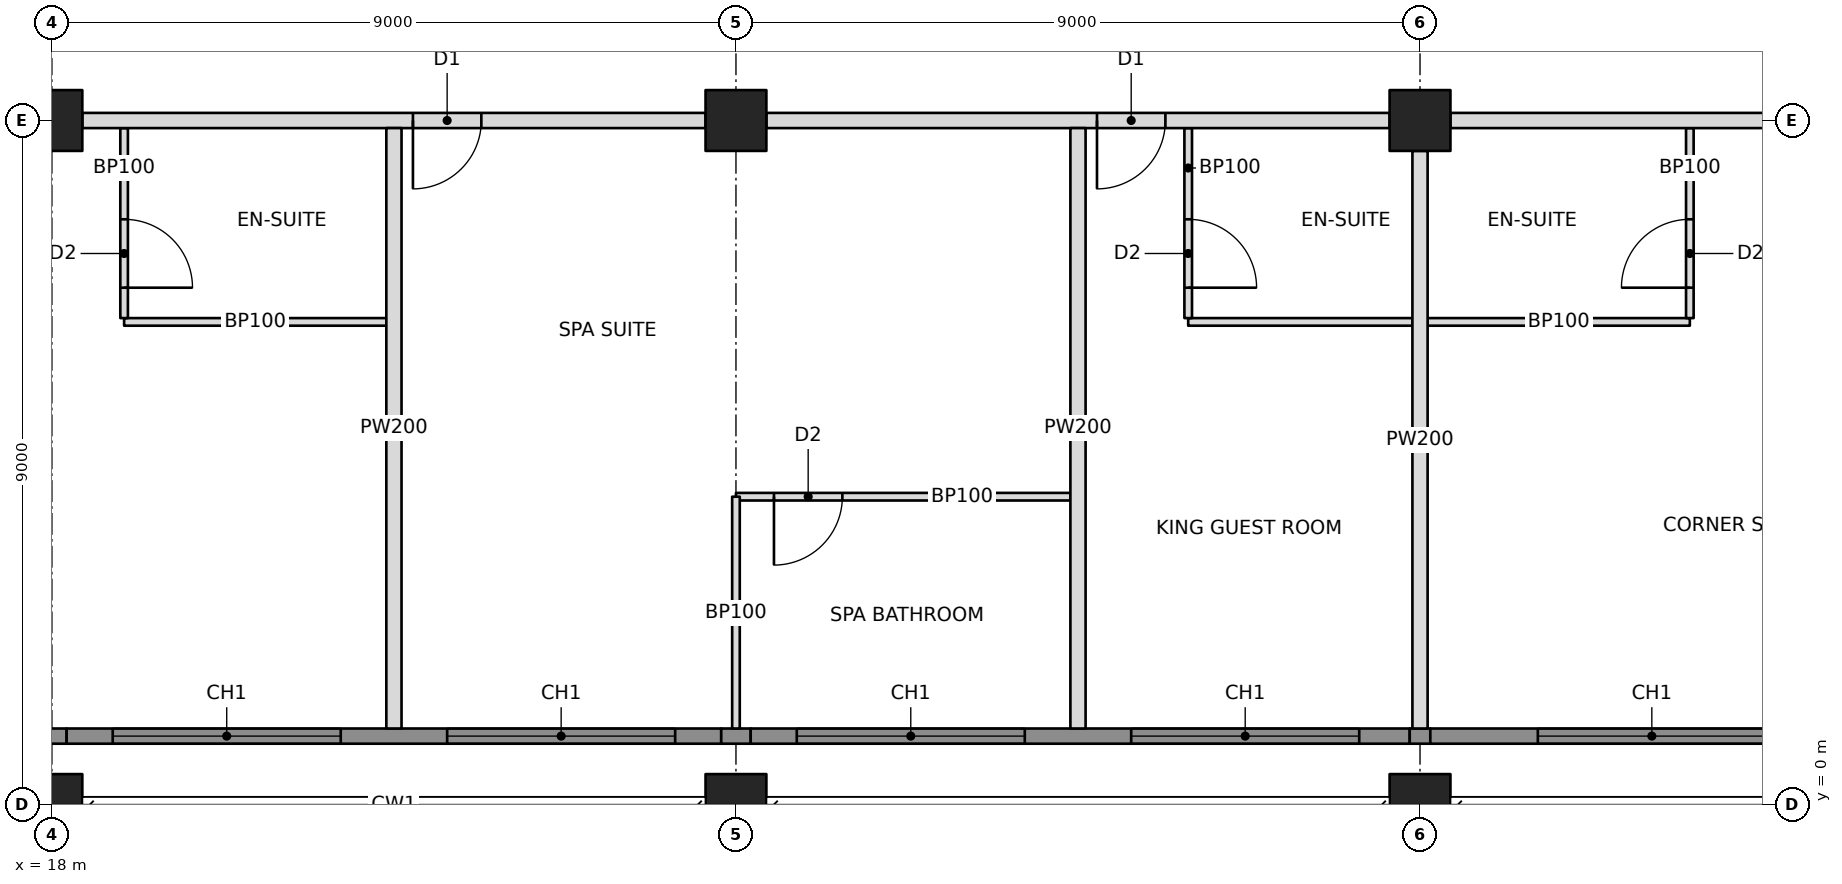
"""IFC4 building model, lengths in metres.
Left out: names, types, materials, properties, quantities, classifications, styles, units other than length and angle.
Written with IfcOpenShell. Run it as: python <this file> out.ifc"""

import sys

from ifc_helpers import new_model, si_unit, direction, frame, frame_2d, origin, origin_2d, place, context, subcontext, project, spatial, rectangle, hollow_rectangle, extrude, element, fill, save


model = new_model("IFC4")
c1 = context("Model", 3, precision=1e-05, world=origin(), true_north=direction((0.0, 1.0)))
c2 = subcontext(c1, "Body", "Model", "MODEL_VIEW")
j1 = project(units=[si_unit("LENGTHUNIT", "METRE"), si_unit("PLANEANGLEUNIT", "RADIAN")], contexts=[c1])
p1 = place(None, origin())
s1 = spatial("IfcSite", under=j1, at=p1, CompositionType="ELEMENT")
p2 = place(p1, origin())
s2 = spatial("IfcBuilding", under=s1, at=p2, CompositionType="ELEMENT")
p3 = place(p2, frame((0.0, 0.0, 211.4)))
s3 = spatial("IfcBuildingStorey", under=s2, at=p3, CompositionType="ELEMENT", Elevation=211.4)
p4 = place(p3, frame((18.0, 0.0, 0.0), z_axis=(0.0, 0.0, 1.0), x_axis=(1.0, 0.0, 0.0)))
e1 = element("IfcColumn", 1, at=p4, inside=s3, PredefinedType="COLUMN", context=c2, shape_type="SweptSolid", body=[
    extrude(hollow_rectangle(XDim=0.8, YDim=0.8, WallThickness=0.06, at=origin_2d()), origin(), (0.0, 0.0, 1.0), 3.4),
])
p5 = place(p3, frame((18.0, 9.0, 0.0), z_axis=(0.0, 0.0, 1.0), x_axis=(1.0, 0.0, 0.0)))
e2 = element("IfcColumn", 2, at=p5, inside=s3, PredefinedType="COLUMN", context=c2, shape_type="SweptSolid", body=[
    extrude(hollow_rectangle(XDim=0.8, YDim=0.8, WallThickness=0.05, at=origin_2d()), origin(), (0.0, 0.0, 1.0), 3.4),
])
p6 = place(p3, frame((27.0, 0.0, 0.0), z_axis=(0.0, 0.0, 1.0), x_axis=(1.0, 0.0, 0.0)))
e3 = element("IfcColumn", 3, at=p6, inside=s3, PredefinedType="COLUMN", context=c2, shape_type="SweptSolid", body=[
    extrude(hollow_rectangle(XDim=0.8, YDim=0.8, WallThickness=0.06, at=origin_2d()), origin(), (0.0, 0.0, 1.0), 3.4),
])
p7 = place(p3, frame((27.0, 9.0, 0.0), z_axis=(0.0, 0.0, 1.0), x_axis=(1.0, 0.0, 0.0)))
e4 = element("IfcColumn", 4, at=p7, inside=s3, PredefinedType="COLUMN", context=c2, shape_type="SweptSolid", body=[
    extrude(hollow_rectangle(XDim=0.8, YDim=0.8, WallThickness=0.05, at=origin_2d()), origin(), (0.0, 0.0, 1.0), 3.4),
])
p8 = place(p3, frame((36.0, 0.0, 0.0), z_axis=(0.0, 0.0, 1.0), x_axis=(1.0, 0.0, 0.0)))
e5 = element("IfcColumn", 5, at=p8, inside=s3, PredefinedType="COLUMN", context=c2, shape_type="SweptSolid", body=[
    extrude(hollow_rectangle(XDim=0.8, YDim=0.8, WallThickness=0.06, at=origin_2d()), origin(), (0.0, 0.0, 1.0), 3.4),
])
p9 = place(p3, frame((36.0, 9.0, 0.0), z_axis=(0.0, 0.0, 1.0), x_axis=(0.0, 1.0, 0.0)))
e6 = element("IfcColumn", 6, at=p9, inside=s3, PredefinedType="COLUMN", context=c2, shape_type="SweptSolid", body=[
    extrude(hollow_rectangle(XDim=0.8, YDim=0.8, WallThickness=0.05, at=origin_2d()), origin(), (0.0, 0.0, 1.0), 3.4),
])
p10 = place(p3, frame((18.4, 9.0, 0.0), z_axis=(0.0, 0.0, 1.0), x_axis=(1.0, 0.0, 0.0)))
e7 = element("IfcWall", 7, at=p10, inside=s3, PredefinedType="PARTITIONING", context=c2, shape_type="SweptSolid", body=[
    extrude(rectangle(XDim=8.2, YDim=0.2, at=frame_2d((4.1, 0.0))), origin(), (0.0, 0.0, 1.0), 2.405),
])
p11 = place(p10, frame((4.35, 0.0, 0.0)))
e8 = element("IfcOpeningElement", 8, at=p11, cuts=e7, PredefinedType="OPENING", context=c2, shape_type="SweptSolid", body=[
    extrude(rectangle(XDim=0.9, YDim=2.1, at=frame_2d((0.45, 1.05))), frame((0.0, 0.11, 0.0), z_axis=(0.0, -1.0, 0.0), x_axis=(1.0, 0.0, 0.0)), (0.0, 0.0, 1.0), 0.22),
])
p12 = place(p3, frame((27.4, 9.0, 0.0), z_axis=(0.0, 0.0, 1.0), x_axis=(1.0, 0.0, 0.0)))
e9 = element("IfcWall", 9, at=p12, inside=s3, PredefinedType="PARTITIONING", context=c2, shape_type="SweptSolid", body=[
    extrude(rectangle(XDim=8.2, YDim=0.2, at=frame_2d((4.1, 0.0))), origin(), (0.0, 0.0, 1.0), 2.405),
])
p13 = place(p12, frame((4.35, 0.0, 0.0)))
e10 = element("IfcOpeningElement", 10, at=p13, cuts=e9, PredefinedType="OPENING", context=c2, shape_type="SweptSolid", body=[
    extrude(rectangle(XDim=0.9, YDim=2.1, at=frame_2d((0.45, 1.05))), frame((0.0, 0.11, 0.0), z_axis=(0.0, -1.0, 0.0), x_axis=(1.0, 0.0, 0.0)), (0.0, 0.0, 1.0), 0.22),
])
p14 = place(p3, frame((36.4, 9.0, 0.0), z_axis=(0.0, 0.0, 1.0), x_axis=(1.0, 0.0, 0.0)))
e11 = element("IfcWall", 11, at=p14, inside=s3, PredefinedType="PARTITIONING", context=c2, shape_type="SweptSolid", body=[
    extrude(rectangle(XDim=7.6, YDim=0.2, at=frame_2d((3.8, 0.0))), origin(), (0.0, 0.0, 1.0), 2.438),
])
p15 = place(p14, frame((6.45, 0.0, 0.0)))
e12 = element("IfcOpeningElement", 12, at=p15, cuts=e11, PredefinedType="OPENING", context=c2, shape_type="SweptSolid", body=[
    extrude(rectangle(XDim=0.9, YDim=2.1, at=frame_2d((0.45, 1.05))), frame((0.0, 0.11, 0.0), z_axis=(0.0, -1.0, 0.0), x_axis=(1.0, 0.0, 0.0)), (0.0, 0.0, 1.0), 0.22),
])
for number, where, z_axis, x_axis in (
    (13, (22.5, 8.9, 0.0), (0.0, 0.0, 1.0), (0.0, -1.0, 0.0)),
    (14, (31.5, 8.9, 0.0), (0.0, 0.0, 1.0), (0.0, -1.0, 0.0)),
):
    element("IfcWall", number, at=place(p3, frame(where, z_axis=z_axis, x_axis=x_axis)), inside=s3, PredefinedType="PARTITIONING", context=c2, shape_type="SweptSolid", body=[
        extrude(rectangle(XDim=7.9, YDim=0.2, at=frame_2d((3.95, 0.0))), origin(), (0.0, 0.0, 1.0), 2.404),
    ])
p16 = place(p3, frame((36.0, 8.6, 0.0), z_axis=(0.0, 0.0, 1.0), x_axis=(0.0, -1.0, 0.0)))
e15 = element("IfcWall", 15, at=p16, inside=s3, PredefinedType="PARTITIONING", context=c2, shape_type="SweptSolid", body=[
    extrude(rectangle(XDim=7.6, YDim=0.2, at=frame_2d((3.8, 0.0))), origin(), (0.0, 0.0, 1.0), 2.438),
])
p17 = place(p3, frame((18.95, 6.35, 0.0), z_axis=(0.0, 0.0, 1.0), x_axis=(1.0, 0.0, 0.0)))
e16 = element("IfcWall", 16, at=p17, inside=s3, PredefinedType="PARTITIONING", context=c2, shape_type="SweptSolid", body=[
    extrude(rectangle(XDim=3.45, YDim=0.1, at=frame_2d((1.725, 0.0))), origin(), (0.0, 0.0, 1.0), 3.2),
])
p18 = place(p3, frame((18.95, 8.9, 0.0), z_axis=(0.0, 0.0, 1.0), x_axis=(0.0, -1.0, 0.0)))
e17 = element("IfcWall", 17, at=p18, inside=s3, PredefinedType="PARTITIONING", context=c2, shape_type="SweptSolid", body=[
    extrude(rectangle(XDim=2.5, YDim=0.1, at=frame_2d((1.25, 0.0))), origin(), (0.0, 0.0, 1.0), 2.404),
])
p19 = place(p18, frame((1.2, 0.0, 0.0)))
e18 = element("IfcOpeningElement", 18, at=p19, cuts=e17, PredefinedType="OPENING", context=c2, shape_type="SweptSolid", body=[
    extrude(rectangle(XDim=0.9, YDim=2.1, at=frame_2d((0.45, 1.05))), frame((0.0, 0.06, 0.0), z_axis=(0.0, -1.0, 0.0), x_axis=(1.0, 0.0, 0.0)), (0.0, 0.0, 1.0), 0.12),
])
p20 = place(p3, frame((27.0, 4.05, 0.0), z_axis=(0.0, 0.0, 1.0), x_axis=(1.0, 0.0, 0.0)))
e19 = element("IfcWall", 19, at=p20, inside=s3, PredefinedType="PARTITIONING", context=c2, shape_type="SweptSolid", body=[
    extrude(rectangle(XDim=4.4, YDim=0.1, at=frame_2d((2.2, 0.0))), origin(), (0.0, 0.0, 1.0), 2.404),
])
p21 = place(p20, frame((0.5, 0.0, 0.0)))
e20 = element("IfcOpeningElement", 20, at=p21, cuts=e19, PredefinedType="OPENING", context=c2, shape_type="SweptSolid", body=[
    extrude(rectangle(XDim=0.9, YDim=2.1, at=frame_2d((0.45, 1.05))), frame((0.0, 0.06, 0.0), z_axis=(0.0, -1.0, 0.0), x_axis=(1.0, 0.0, 0.0)), (0.0, 0.0, 1.0), 0.12),
])
p22 = place(p3, frame((27.0, 4.05, 0.0), z_axis=(0.0, 0.0, 1.0), x_axis=(0.0, -1.0, 0.0)))
e21 = element("IfcWall", 21, at=p22, inside=s3, PredefinedType="PARTITIONING", context=c2, shape_type="SweptSolid", body=[
    extrude(rectangle(XDim=3.05, YDim=0.1, at=frame_2d((1.525, 0.0))), origin(), (0.0, 0.0, 1.0), 2.405),
])
p23 = place(p3, frame((32.95, 6.35, 0.0), z_axis=(0.0, 0.0, 1.0), x_axis=(1.0, 0.0, 0.0)))
e22 = element("IfcWall", 22, at=p23, inside=s3, PredefinedType="PARTITIONING", context=c2, shape_type="SweptSolid", body=[
    extrude(rectangle(XDim=2.95, YDim=0.1, at=frame_2d((1.475, 0.0))), origin(), (0.0, 0.0, 1.0), 2.438),
])
p24 = place(p3, frame((32.95, 8.9, 0.0), z_axis=(0.0, 0.0, 1.0), x_axis=(0.0, -1.0, 0.0)))
e23 = element("IfcWall", 23, at=p24, inside=s3, PredefinedType="PARTITIONING", context=c2, shape_type="SweptSolid", body=[
    extrude(rectangle(XDim=2.5, YDim=0.1, at=frame_2d((1.25, 0.0))), origin(), (0.0, 0.0, 1.0), 2.404),
])
p25 = place(p24, frame((1.2, 0.0, 0.0)))
e24 = element("IfcOpeningElement", 24, at=p25, cuts=e23, PredefinedType="OPENING", context=c2, shape_type="SweptSolid", body=[
    extrude(rectangle(XDim=0.9, YDim=2.1, at=frame_2d((0.45, 1.05))), frame((0.0, 0.06, 0.0), z_axis=(0.0, -1.0, 0.0), x_axis=(1.0, 0.0, 0.0)), (0.0, 0.0, 1.0), 0.12),
])
p26 = place(p3, frame((36.1, 6.35, 0.0), z_axis=(0.0, 0.0, 1.0), x_axis=(1.0, 0.0, 0.0)))
e25 = element("IfcWall", 25, at=p26, inside=s3, PredefinedType="PARTITIONING", context=c2, shape_type="SweptSolid", body=[
    extrude(rectangle(XDim=3.45, YDim=0.1, at=frame_2d((1.725, 0.0))), origin(), (0.0, 0.0, 1.0), 2.438),
])
p27 = place(p3, frame((39.55, 8.9, 0.0), z_axis=(0.0, 0.0, 1.0), x_axis=(0.0, -1.0, 0.0)))
e26 = element("IfcWall", 26, at=p27, inside=s3, PredefinedType="PARTITIONING", context=c2, shape_type="SweptSolid", body=[
    extrude(rectangle(XDim=2.5, YDim=0.1, at=frame_2d((1.25, 0.0))), origin(), (0.0, 0.0, 1.0), 2.438),
])
p28 = place(p27, frame((1.2, 0.0, 0.0)))
e27 = element("IfcOpeningElement", 27, at=p28, cuts=e26, PredefinedType="OPENING", context=c2, shape_type="SweptSolid", body=[
    extrude(rectangle(XDim=0.9, YDim=2.1, at=frame_2d((0.45, 1.05))), frame((0.0, 0.06, 0.0), z_axis=(0.0, -1.0, 0.0), x_axis=(1.0, 0.0, 0.0)), (0.0, 0.0, 1.0), 0.12),
])
p29 = place(p3, frame((17.806, 0.9, 0.0), z_axis=(0.0, 0.0, 1.0), x_axis=(1.0, 0.0, 0.0)))
e28 = element("IfcWall", 28, at=p29, inside=s3, PredefinedType="SOLIDWALL", context=c2, shape_type="SweptSolid", body=[
    extrude(rectangle(XDim=0.388, YDim=0.2, at=frame_2d((0.194, 0.0))), origin(), (0.0, 0.0, 1.0), 2.404),
])
p30 = place(p3, frame((18.194, 0.9, 0.0), z_axis=(0.0, 0.0, 1.0), x_axis=(1.0, 0.0, 0.0)))
e29 = element("IfcWall", 29, at=p30, inside=s3, PredefinedType="SOLIDWALL", context=c2, shape_type="SweptSolid", body=[
    extrude(rectangle(XDim=8.612, YDim=0.2, at=frame_2d((4.306, 0.0))), origin(), (0.0, 0.0, 1.0), 3.2),
])
p31 = place(p30, frame((0.606, 0.0, 0.6)))
e30 = element("IfcOpeningElement", 30, at=p31, cuts=e29, PredefinedType="OPENING", context=c2, shape_type="SweptSolid", body=[
    extrude(rectangle(XDim=3.0, YDim=2.2, at=frame_2d((1.5, 1.1))), frame((0.0, 0.11, 0.0), z_axis=(0.0, -1.0, 0.0), x_axis=(1.0, 0.0, 0.0)), (0.0, 0.0, 1.0), 0.22),
])
p32 = place(p30, frame((5.006, 0.0, 0.6)))
e31 = element("IfcOpeningElement", 31, at=p32, cuts=e29, PredefinedType="OPENING", context=c2, shape_type="SweptSolid", body=[
    extrude(rectangle(XDim=3.0, YDim=2.2, at=frame_2d((1.5, 1.1))), frame((0.0, 0.11, 0.0), z_axis=(0.0, -1.0, 0.0), x_axis=(1.0, 0.0, 0.0)), (0.0, 0.0, 1.0), 0.22),
])
p33 = place(p3, frame((26.806, 0.9, 0.0), z_axis=(0.0, 0.0, 1.0), x_axis=(1.0, 0.0, 0.0)))
e32 = element("IfcWall", 32, at=p33, inside=s3, PredefinedType="SOLIDWALL", context=c2, shape_type="SweptSolid", body=[
    extrude(rectangle(XDim=0.388, YDim=0.2, at=frame_2d((0.194, 0.0))), origin(), (0.0, 0.0, 1.0), 2.404),
])
p34 = place(p3, frame((27.194, 0.9, 0.0), z_axis=(0.0, 0.0, 1.0), x_axis=(1.0, 0.0, 0.0)))
e33 = element("IfcWall", 33, at=p34, inside=s3, PredefinedType="SOLIDWALL", context=c2, shape_type="SweptSolid", body=[
    extrude(rectangle(XDim=8.671, YDim=0.2, at=frame_2d((4.335, 0.0))), origin(), (0.0, 0.0, 1.0), 3.2),
])
p35 = place(p34, frame((0.606, 0.0, 0.6)))
e34 = element("IfcOpeningElement", 34, at=p35, cuts=e33, PredefinedType="OPENING", context=c2, shape_type="SweptSolid", body=[
    extrude(rectangle(XDim=3.0, YDim=2.2, at=frame_2d((1.5, 1.1))), frame((0.0, 0.11, 0.0), z_axis=(0.0, -1.0, 0.0), x_axis=(1.0, 0.0, 0.0)), (0.0, 0.0, 1.0), 0.22),
])
p36 = place(p34, frame((5.006, 0.0, 0.6)))
e35 = element("IfcOpeningElement", 35, at=p36, cuts=e33, PredefinedType="OPENING", context=c2, shape_type="SweptSolid", body=[
    extrude(rectangle(XDim=3.0, YDim=2.2, at=frame_2d((1.5, 1.1))), frame((0.0, 0.11, 0.0), z_axis=(0.0, -1.0, 0.0), x_axis=(1.0, 0.0, 0.0)), (0.0, 0.0, 1.0), 0.22),
])
p37 = place(p3, frame((35.865, 0.9, 0.0), z_axis=(0.0, 0.0, 1.0), x_axis=(1.0, 0.0, 0.0)))
e36 = element("IfcWall", 36, at=p37, inside=s3, PredefinedType="SOLIDWALL", context=c2, shape_type="SweptSolid", body=[
    extrude(rectangle(XDim=0.271, YDim=0.2, at=frame_2d((0.135, 0.0))), origin(), (0.0, 0.0, 1.0), 2.438),
])
p38 = place(p3, frame((36.135, 0.9, 0.0), z_axis=(0.0, 0.0, 1.0), x_axis=(1.0, 0.0, 0.0)))
e37 = element("IfcWall", 37, at=p38, inside=s3, PredefinedType="SOLIDWALL", context=c2, shape_type="SweptSolid", body=[
    extrude(rectangle(XDim=5.865, YDim=0.2, at=frame_2d((2.932, 0.0))), origin(), (0.0, 0.0, 1.0), 3.2),
])
p39 = place(p38, frame((1.415, 0.0, 0.6)))
e38 = element("IfcOpeningElement", 38, at=p39, cuts=e37, PredefinedType="OPENING", context=c2, shape_type="SweptSolid", body=[
    extrude(rectangle(XDim=3.0, YDim=2.2, at=frame_2d((1.5, 1.1))), frame((0.0, 0.11, 0.0), z_axis=(0.0, -1.0, 0.0), x_axis=(1.0, 0.0, 0.0)), (0.0, 0.0, 1.0), 0.22),
])
p40 = place(p31, origin())
e39 = element("IfcWindow", 39, at=p40, inside=s3, PartitioningType="TRIPLE_PANEL_VERTICAL", PredefinedType="WINDOW", context=c2, shape_type="SweptSolid", body=[
    extrude(rectangle(XDim=3.0, YDim=2.2, at=frame_2d((1.5, 1.1))), frame((0.0, 0.03, 0.0), z_axis=(0.0, -1.0, 0.0), x_axis=(1.0, 0.0, 0.0)), (0.0, 0.0, 1.0), 0.06),
])
fill(e30, e39)
p41 = place(p32, origin())
e40 = element("IfcWindow", 40, at=p41, inside=s3, PartitioningType="TRIPLE_PANEL_VERTICAL", PredefinedType="WINDOW", context=c2, shape_type="SweptSolid", body=[
    extrude(rectangle(XDim=3.0, YDim=2.2, at=frame_2d((1.5, 1.1))), frame((0.0, 0.03, 0.0), z_axis=(0.0, -1.0, 0.0), x_axis=(1.0, 0.0, 0.0)), (0.0, 0.0, 1.0), 0.06),
])
fill(e31, e40)
p42 = place(p35, origin())
e41 = element("IfcWindow", 41, at=p42, inside=s3, PartitioningType="TRIPLE_PANEL_VERTICAL", PredefinedType="WINDOW", context=c2, shape_type="SweptSolid", body=[
    extrude(rectangle(XDim=3.0, YDim=2.2, at=frame_2d((1.5, 1.1))), frame((0.0, 0.03, 0.0), z_axis=(0.0, -1.0, 0.0), x_axis=(1.0, 0.0, 0.0)), (0.0, 0.0, 1.0), 0.06),
])
fill(e34, e41)
p43 = place(p36, origin())
e42 = element("IfcWindow", 42, at=p43, inside=s3, PartitioningType="TRIPLE_PANEL_VERTICAL", PredefinedType="WINDOW", context=c2, shape_type="SweptSolid", body=[
    extrude(rectangle(XDim=3.0, YDim=2.2, at=frame_2d((1.5, 1.1))), frame((0.0, 0.03, 0.0), z_axis=(0.0, -1.0, 0.0), x_axis=(1.0, 0.0, 0.0)), (0.0, 0.0, 1.0), 0.06),
])
fill(e35, e42)
p44 = place(p39, origin())
e43 = element("IfcWindow", 43, at=p44, inside=s3, PartitioningType="TRIPLE_PANEL_VERTICAL", PredefinedType="WINDOW", context=c2, shape_type="SweptSolid", body=[
    extrude(rectangle(XDim=3.0, YDim=2.2, at=frame_2d((1.5, 1.1))), frame((0.0, 0.03, 0.0), z_axis=(0.0, -1.0, 0.0), x_axis=(1.0, 0.0, 0.0)), (0.0, 0.0, 1.0), 0.06),
])
fill(e38, e43)
p45 = place(p19, origin())
e44 = element("IfcDoor", 44, at=p45, inside=s3, OperationType="SINGLE_SWING_RIGHT", PredefinedType="DOOR", context=c2, shape_type="SweptSolid", body=[
    extrude(rectangle(XDim=0.9, YDim=2.1, at=frame_2d((0.45, 1.05))), frame((0.0, 0.025, 0.0), z_axis=(0.0, -1.0, 0.0), x_axis=(1.0, 0.0, 0.0)), (0.0, 0.0, 1.0), 0.05),
])
fill(e18, e44)
p46 = place(p21, frame((0.9, 0.0, 0.0), z_axis=(0.0, 0.0, 1.0), x_axis=(-1.0, 0.0, 0.0)))
e45 = element("IfcDoor", 45, at=p46, inside=s3, OperationType="SINGLE_SWING_RIGHT", PredefinedType="DOOR", context=c2, shape_type="SweptSolid", body=[
    extrude(rectangle(XDim=0.9, YDim=2.1, at=frame_2d((0.45, 1.05))), frame((0.0, 0.025, 0.0), z_axis=(0.0, -1.0, 0.0), x_axis=(1.0, 0.0, 0.0)), (0.0, 0.0, 1.0), 0.05),
])
fill(e20, e45)
p47 = place(p11, frame((0.9, 0.0, 0.0), z_axis=(0.0, 0.0, 1.0), x_axis=(-1.0, 0.0, 0.0)))
e46 = element("IfcDoor", 46, at=p47, inside=s3, OperationType="SINGLE_SWING_RIGHT", PredefinedType="DOOR", context=c2, shape_type="SweptSolid", body=[
    extrude(rectangle(XDim=0.9, YDim=2.1, at=frame_2d((0.45, 1.05))), frame((0.0, 0.025, 0.0), z_axis=(0.0, -1.0, 0.0), x_axis=(1.0, 0.0, 0.0)), (0.0, 0.0, 1.0), 0.05),
])
fill(e8, e46)
p48 = place(p25, origin())
e47 = element("IfcDoor", 47, at=p48, inside=s3, OperationType="SINGLE_SWING_RIGHT", PredefinedType="DOOR", context=c2, shape_type="SweptSolid", body=[
    extrude(rectangle(XDim=0.9, YDim=2.1, at=frame_2d((0.45, 1.05))), frame((0.0, 0.025, 0.0), z_axis=(0.0, -1.0, 0.0), x_axis=(1.0, 0.0, 0.0)), (0.0, 0.0, 1.0), 0.05),
])
fill(e24, e47)
p49 = place(p13, frame((0.9, 0.0, 0.0), z_axis=(0.0, 0.0, 1.0), x_axis=(-1.0, 0.0, 0.0)))
e48 = element("IfcDoor", 48, at=p49, inside=s3, OperationType="SINGLE_SWING_RIGHT", PredefinedType="DOOR", context=c2, shape_type="SweptSolid", body=[
    extrude(rectangle(XDim=0.9, YDim=2.1, at=frame_2d((0.45, 1.05))), frame((0.0, 0.025, 0.0), z_axis=(0.0, -1.0, 0.0), x_axis=(1.0, 0.0, 0.0)), (0.0, 0.0, 1.0), 0.05),
])
fill(e10, e48)
p50 = place(p28, frame((0.9, 0.0, 0.0), z_axis=(0.0, 0.0, 1.0), x_axis=(-1.0, 0.0, 0.0)))
e49 = element("IfcDoor", 49, at=p50, inside=s3, OperationType="SINGLE_SWING_LEFT", PredefinedType="DOOR", context=c2, shape_type="SweptSolid", body=[
    extrude(rectangle(XDim=0.9, YDim=2.1, at=frame_2d((0.45, 1.05))), frame((0.0, 0.025, 0.0), z_axis=(0.0, -1.0, 0.0), x_axis=(1.0, 0.0, 0.0)), (0.0, 0.0, 1.0), 0.05),
])
fill(e27, e49)
save(model, sys.argv[1])
